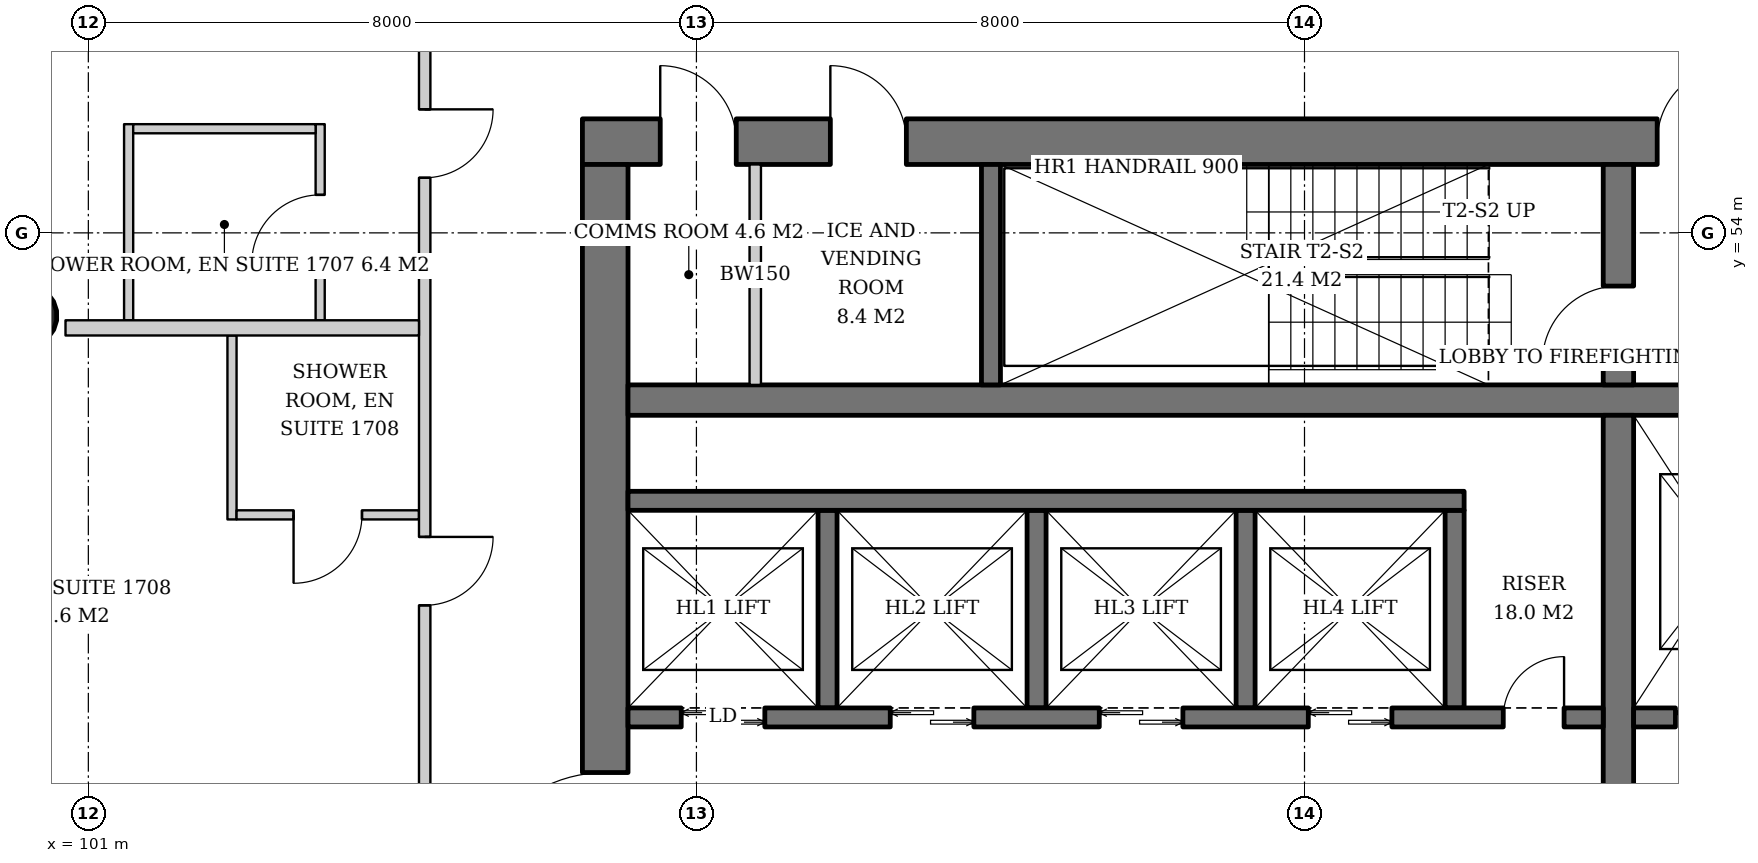
"""IFC4 building model, lengths in metres.
Left out: names, types, materials, properties, quantities, classifications, styles, units other than length and angle.
Written with IfcOpenShell. Run it as: python <this file> out.ifc"""

import sys

from ifc_helpers import new_model, si_unit, direction, frame, frame_2d, origin, origin_2d, place, context, subcontext, project, spatial, rectangle, hollow_circle, extrude, element, fill, save


model = new_model("IFC4")
c1 = context("Model", 3, precision=1e-05, world=origin(), true_north=direction((0.0, 1.0)))
c2 = subcontext(c1, "Body", "Model", "MODEL_VIEW")
j1 = project(units=[si_unit("LENGTHUNIT", "METRE"), si_unit("PLANEANGLEUNIT", "RADIAN")], contexts=[c1])
p1 = place(None, origin())
s1 = spatial("IfcSite", under=j1, at=p1, CompositionType="ELEMENT")
p2 = place(p1, origin())
s2 = spatial("IfcBuilding", under=s1, at=p2, CompositionType="ELEMENT")
p3 = place(p2, frame((0.0, 0.0, 70.4)))
s3 = spatial("IfcBuildingStorey", under=s2, at=p3, CompositionType="ELEMENT", Elevation=70.4)
p4 = place(p3, frame((100.129, 52.935, 0.0), z_axis=(0.043059584825, -0.021497706284, 0.998841188968), x_axis=(0.446680166538, 0.894693706707, 0.0)))
e1 = element("IfcColumn", 1, at=p4, inside=s3, PredefinedType="COLUMN", context=c2, shape_type="SweptSolid", body=[
    extrude(hollow_circle(Radius=0.406, WallThickness=0.03, at=origin_2d()), origin(), (0.0, 0.0, 1.0), 3.804),
])
p5 = place(p3, frame((107.5, 55.2, 0.0), z_axis=(0.0, 0.0, 1.0), x_axis=(1.0, 0.0, 0.0)))
e2 = element("IfcWall", 2, at=p5, inside=s3, PredefinedType="SHEAR", context=c2, shape_type="SweptSolid", body=[
    extrude(rectangle(XDim=19.0, YDim=0.6, at=frame_2d((9.5, 0.0))), origin(), (0.0, 0.0, 1.0), 3.8),
])
p6 = place(p5, frame((14.14, 0.0, 0.0)))
e3 = element("IfcOpeningElement", 3, at=p6, cuts=e2, PredefinedType="OPENING", context=c2, shape_type="SweptSolid", body=[
    extrude(rectangle(XDim=1.0, YDim=2.1, at=frame_2d((0.5, 1.05))), frame((0.0, 0.31, 0.0), z_axis=(0.0, -1.0, 0.0), x_axis=(1.0, 0.0, 0.0)), (0.0, 0.0, 1.0), 0.62),
])
p7 = place(p5, frame((1.024, 0.0, 0.0)))
e4 = element("IfcOpeningElement", 4, at=p7, cuts=e2, PredefinedType="OPENING", context=c2, shape_type="SweptSolid", body=[
    extrude(rectangle(XDim=1.0, YDim=2.1, at=frame_2d((0.5, 1.05))), frame((0.0, 0.31, 0.0), z_axis=(0.0, -1.0, 0.0), x_axis=(1.0, 0.0, 0.0)), (0.0, 0.0, 1.0), 0.62),
])
p8 = place(p5, frame((3.262, 0.0, 0.0)))
e5 = element("IfcOpeningElement", 5, at=p8, cuts=e2, PredefinedType="OPENING", context=c2, shape_type="SweptSolid", body=[
    extrude(rectangle(XDim=1.0, YDim=2.1, at=frame_2d((0.5, 1.05))), frame((0.0, 0.31, 0.0), z_axis=(0.0, -1.0, 0.0), x_axis=(1.0, 0.0, 0.0)), (0.0, 0.0, 1.0), 0.62),
])
p9 = place(p3, frame((107.8, 37.1, 0.0), z_axis=(0.0, 0.0, 1.0), x_axis=(0.0, 1.0, 0.0)))
e6 = element("IfcWall", 6, at=p9, inside=s3, PredefinedType="SHEAR", context=c2, shape_type="SweptSolid", body=[
    extrude(rectangle(XDim=17.8, YDim=0.6, at=frame_2d((8.9, 0.0))), origin(), (0.0, 0.0, 1.0), 3.8),
])
p10 = place(p9, frame((8.0, 0.0, 0.0)))
e7 = element("IfcOpeningElement", 7, at=p10, cuts=e6, PredefinedType="OPENING", context=c2, shape_type="SweptSolid", body=[
    extrude(rectangle(XDim=1.8, YDim=2.4, at=frame_2d((0.9, 1.2))), frame((0.0, 0.31, 0.0), z_axis=(0.0, -1.0, 0.0), x_axis=(1.0, 0.0, 0.0)), (0.0, 0.0, 1.0), 0.62),
])
p11 = place(p3, frame((108.1, 51.8, 0.0), z_axis=(0.0, 0.0, 1.0), x_axis=(1.0, 0.0, 0.0)))
e8 = element("IfcWall", 8, at=p11, inside=s3, PredefinedType="SHEAR", context=c2, shape_type="SweptSolid", body=[
    extrude(rectangle(XDim=17.8, YDim=0.4, at=frame_2d((8.9, 0.0))), origin(), (0.0, 0.0, 1.0), 3.8),
])
p12 = place(p3, frame((121.13, 40.4, 0.0), z_axis=(0.0, 0.0, 1.0), x_axis=(0.0, 1.0, 0.0)))
e9 = element("IfcWall", 9, at=p12, inside=s3, PredefinedType="SHEAR", context=c2, shape_type="SweptSolid", body=[
    extrude(rectangle(XDim=11.2, YDim=0.4, at=frame_2d((5.6, 0.0))), origin(), (0.0, 0.0, 1.0), 3.8),
])
p13 = place(p3, frame((121.13, 52.0, 0.0), z_axis=(0.0, 0.0, 1.0), x_axis=(0.0, 1.0, 0.0)))
e10 = element("IfcWall", 10, at=p13, inside=s3, PredefinedType="SHEAR", context=c2, shape_type="SweptSolid", body=[
    extrude(rectangle(XDim=2.9, YDim=0.4, at=frame_2d((1.45, 0.0))), origin(), (0.0, 0.0, 1.0), 3.8),
])
p14 = place(p13, frame((0.3, 0.0, 0.0)))
e11 = element("IfcOpeningElement", 11, at=p14, cuts=e10, PredefinedType="OPENING", context=c2, shape_type="SweptSolid", body=[
    extrude(rectangle(XDim=1.0, YDim=2.1, at=frame_2d((0.5, 1.05))), frame((0.0, 0.21, 0.0), z_axis=(0.0, -1.0, 0.0), x_axis=(1.0, 0.0, 0.0)), (0.0, 0.0, 1.0), 0.42),
])
p15 = place(p3, frame((112.875, 52.0, 0.0), z_axis=(0.0, 0.0, 1.0), x_axis=(0.0, 1.0, 0.0)))
e12 = element("IfcWall", 12, at=p15, inside=s3, PredefinedType="SHEAR", context=c2, shape_type="SweptSolid", body=[
    extrude(rectangle(XDim=2.9, YDim=0.25, at=frame_2d((1.45, 0.0))), origin(), (0.0, 0.0, 1.0), 3.8),
])
for number, where, z_axis, x_axis in (
    (13, (110.725, 47.75, 0.0), (0.0, 0.0, 1.0), (0.0, 1.0, 0.0)),
    (14, (113.475, 47.75, 0.0), (0.0, 0.0, 1.0), (0.0, 1.0, 0.0)),
    (15, (116.225, 47.75, 0.0), (0.0, 0.0, 1.0), (0.0, 1.0, 0.0)),
    (16, (118.975, 47.75, 0.0), (0.0, 0.0, 1.0), (0.0, 1.0, 0.0)),
):
    element("IfcWall", number, at=place(p3, frame(where, z_axis=z_axis, x_axis=x_axis)), inside=s3, PredefinedType="SHEAR", context=c2, shape_type="SweptSolid", body=[
        extrude(rectangle(XDim=2.6, YDim=0.25, at=frame_2d((1.3, 0.0))), origin(), (0.0, 0.0, 1.0), 3.8),
    ])
p16 = place(p3, frame((108.1, 50.475, 0.0), z_axis=(0.0, 0.0, 1.0), x_axis=(1.0, 0.0, 0.0)))
e17 = element("IfcWall", 17, at=p16, inside=s3, PredefinedType="SHEAR", context=c2, shape_type="SweptSolid", body=[
    extrude(rectangle(XDim=11.0, YDim=0.25, at=frame_2d((5.5, 0.0))), origin(), (0.0, 0.0, 1.0), 3.8),
])
p17 = place(p3, frame((108.1, 47.625, 0.0), z_axis=(0.0, 0.0, 1.0), x_axis=(1.0, 0.0, 0.0)))
e18 = element("IfcWall", 18, at=p17, inside=s3, PredefinedType="SHEAR", context=c2, shape_type="SweptSolid", body=[
    extrude(rectangle(XDim=12.83, YDim=0.25, at=frame_2d((6.415, 0.0))), origin(), (0.0, 0.0, 1.0), 3.8),
])
p18 = place(p17, frame((0.7, 0.0, 0.0)))
e19 = element("IfcOpeningElement", 19, at=p18, cuts=e18, PredefinedType="OPENING", context=c2, shape_type="SweptSolid", body=[
    extrude(rectangle(XDim=1.1, YDim=2.2, at=frame_2d((0.55, 1.1))), frame((0.0, 0.135, 0.0), z_axis=(0.0, -1.0, 0.0), x_axis=(1.0, 0.0, 0.0)), (0.0, 0.0, 1.0), 0.27),
])
p19 = place(p17, frame((3.45, 0.0, 0.0)))
e20 = element("IfcOpeningElement", 20, at=p19, cuts=e18, PredefinedType="OPENING", context=c2, shape_type="SweptSolid", body=[
    extrude(rectangle(XDim=1.1, YDim=2.2, at=frame_2d((0.55, 1.1))), frame((0.0, 0.135, 0.0), z_axis=(0.0, -1.0, 0.0), x_axis=(1.0, 0.0, 0.0)), (0.0, 0.0, 1.0), 0.27),
])
p20 = place(p17, frame((6.2, 0.0, 0.0)))
e21 = element("IfcOpeningElement", 21, at=p20, cuts=e18, PredefinedType="OPENING", context=c2, shape_type="SweptSolid", body=[
    extrude(rectangle(XDim=1.1, YDim=2.2, at=frame_2d((0.55, 1.1))), frame((0.0, 0.135, 0.0), z_axis=(0.0, -1.0, 0.0), x_axis=(1.0, 0.0, 0.0)), (0.0, 0.0, 1.0), 0.27),
])
p21 = place(p17, frame((8.95, 0.0, 0.0)))
e22 = element("IfcOpeningElement", 22, at=p21, cuts=e18, PredefinedType="OPENING", context=c2, shape_type="SweptSolid", body=[
    extrude(rectangle(XDim=1.1, YDim=2.2, at=frame_2d((0.55, 1.1))), frame((0.0, 0.135, 0.0), z_axis=(0.0, -1.0, 0.0), x_axis=(1.0, 0.0, 0.0)), (0.0, 0.0, 1.0), 0.27),
])
p22 = place(p17, frame((11.515, 0.0, 0.0)))
e23 = element("IfcOpeningElement", 23, at=p22, cuts=e18, PredefinedType="OPENING", context=c2, shape_type="SweptSolid", body=[
    extrude(rectangle(XDim=0.8, YDim=2.0, at=frame_2d((0.4, 1.0))), frame((0.0, 0.135, 0.0), z_axis=(0.0, -1.0, 0.0), x_axis=(1.0, 0.0, 0.0)), (0.0, 0.0, 1.0), 0.27),
])
p23 = place(p3, frame((121.33, 47.625, 0.0), z_axis=(0.0, 0.0, 1.0), x_axis=(1.0, 0.0, 0.0)))
e24 = element("IfcWall", 24, at=p23, inside=s3, PredefinedType="SHEAR", context=c2, shape_type="SweptSolid", body=[
    extrude(rectangle(XDim=4.57, YDim=0.25, at=frame_2d((2.285, 0.0))), origin(), (0.0, 0.0, 1.0), 3.8),
])
p24 = place(p23, frame((0.55, 0.0, 0.0)))
e25 = element("IfcOpeningElement", 25, at=p24, cuts=e24, PredefinedType="OPENING", context=c2, shape_type="SweptSolid", body=[
    extrude(rectangle(XDim=1.4, YDim=2.4, at=frame_2d((0.7, 1.2))), frame((0.0, 0.135, 0.0), z_axis=(0.0, -1.0, 0.0), x_axis=(1.0, 0.0, 0.0)), (0.0, 0.0, 1.0), 0.27),
])
p25 = place(p23, frame((3.26, 0.0, 0.0)))
e26 = element("IfcOpeningElement", 26, at=p25, cuts=e24, PredefinedType="OPENING", context=c2, shape_type="SweptSolid", body=[
    extrude(rectangle(XDim=0.8, YDim=2.0, at=frame_2d((0.4, 1.0))), frame((0.0, 0.135, 0.0), z_axis=(0.0, -1.0, 0.0), x_axis=(1.0, 0.0, 0.0)), (0.0, 0.0, 1.0), 0.27),
])
p26 = place(p3, frame((109.774, 52.0, 0.0), z_axis=(0.0, 0.0, 1.0), x_axis=(0.0, 1.0, 0.0)))
e27 = element("IfcWall", 27, at=p26, inside=s3, PredefinedType="SOLIDWALL", context=c2, shape_type="SweptSolid", body=[
    extrude(rectangle(XDim=2.9, YDim=0.15, at=frame_2d((1.45, 0.0))), origin(), (0.0, 0.0, 1.0), 3.6),
])
p27 = place(p3, frame((104.05, 52.85, 0.0), z_axis=(0.0, 0.0, 1.0), x_axis=(0.0, 1.0, 0.0)))
e28 = element("IfcWall", 28, at=p27, inside=s3, PredefinedType="PARTITIONING", context=c2, shape_type="SweptSolid", body=[
    extrude(rectangle(XDim=2.58, YDim=0.12, at=frame_2d((1.29, 0.0))), origin(), (0.0, 0.0, 1.0), 2.8),
])
p28 = place(p27, frame((0.75, 0.0, 0.0)))
e29 = element("IfcOpeningElement", 29, at=p28, cuts=e28, PredefinedType="OPENING", context=c2, shape_type="SweptSolid", body=[
    extrude(rectangle(XDim=0.9, YDim=2.1, at=frame_2d((0.45, 1.05))), frame((0.0, 0.07, 0.0), z_axis=(0.0, -1.0, 0.0), x_axis=(1.0, 0.0, 0.0)), (0.0, 0.0, 1.0), 0.14),
])
p29 = place(p3, frame((101.53, 52.85, 0.0), z_axis=(0.0, 0.0, 1.0), x_axis=(0.0, 1.0, 0.0)))
e30 = element("IfcWall", 30, at=p29, inside=s3, PredefinedType="PARTITIONING", context=c2, shape_type="SweptSolid", body=[
    extrude(rectangle(XDim=2.58, YDim=0.12, at=frame_2d((1.29, 0.0))), origin(), (0.0, 0.0, 1.0), 2.8),
])
p30 = place(p3, frame((103.99, 55.37, 0.0), z_axis=(0.0, 0.0, 1.0), x_axis=(-1.0, 0.0, 0.0)))
e31 = element("IfcWall", 31, at=p30, inside=s3, PredefinedType="PARTITIONING", context=c2, shape_type="SweptSolid", body=[
    extrude(rectangle(XDim=2.4, YDim=0.12, at=frame_2d((1.2, 0.0))), origin(), (0.0, 0.0, 1.0), 2.8),
])
p31 = place(p3, frame((102.89, 52.65, 0.0), z_axis=(0.0, 0.0, 1.0), x_axis=(0.0, -1.0, 0.0)))
e32 = element("IfcWall", 32, at=p31, inside=s3, PredefinedType="PARTITIONING", context=c2, shape_type="SweptSolid", body=[
    extrude(rectangle(XDim=2.42, YDim=0.12, at=frame_2d((1.21, 0.0))), origin(), (0.0, 0.0, 1.0), 2.847),
])
p32 = place(p3, frame((105.35, 50.29, 0.0), z_axis=(0.0, 0.0, 1.0), x_axis=(-1.0, 0.0, 0.0)))
e33 = element("IfcWall", 33, at=p32, inside=s3, PredefinedType="PARTITIONING", context=c2, shape_type="SweptSolid", body=[
    extrude(rectangle(XDim=2.4, YDim=0.12, at=frame_2d((1.2, 0.0))), origin(), (0.0, 0.0, 1.0), 3.6),
])
p33 = place(p32, frame((0.75, 0.0, 0.0)))
e34 = element("IfcOpeningElement", 34, at=p33, cuts=e33, PredefinedType="OPENING", context=c2, shape_type="SweptSolid", body=[
    extrude(rectangle(XDim=0.9, YDim=2.1, at=frame_2d((0.45, 1.05))), frame((0.0, 0.07, 0.0), z_axis=(0.0, -1.0, 0.0), x_axis=(1.0, 0.0, 0.0)), (0.0, 0.0, 1.0), 0.14),
])
p34 = place(p3, frame((105.425, 57.65, 0.0), z_axis=(0.0, 0.0, 1.0), x_axis=(0.0, -1.0, 0.0)))
e35 = element("IfcWall", 35, at=p34, inside=s3, PredefinedType="PARTITIONING", context=c2, shape_type="SweptSolid", body=[
    extrude(rectangle(XDim=23.15, YDim=0.15, at=frame_2d((11.575, 0.0))), origin(), (0.0, 0.0, 1.0), 2.8),
])
p35 = place(p34, frame((2.025, 0.0, 0.0)))
e36 = element("IfcOpeningElement", 36, at=p35, cuts=e35, PredefinedType="OPENING", context=c2, shape_type="SweptSolid", body=[
    extrude(rectangle(XDim=0.9, YDim=2.1, at=frame_2d((0.45, 1.05))), frame((0.0, 0.085, 0.0), z_axis=(0.0, -1.0, 0.0), x_axis=(1.0, 0.0, 0.0)), (0.0, 0.0, 1.0), 0.17),
])
p36 = place(p34, frame((7.65, 0.0, 0.0)))
e37 = element("IfcOpeningElement", 37, at=p36, cuts=e35, PredefinedType="OPENING", context=c2, shape_type="SweptSolid", body=[
    extrude(rectangle(XDim=0.9, YDim=2.1, at=frame_2d((0.45, 1.05))), frame((0.0, 0.085, 0.0), z_axis=(0.0, -1.0, 0.0), x_axis=(1.0, 0.0, 0.0)), (0.0, 0.0, 1.0), 0.17),
])
p37 = place(p34, frame((16.6, 0.0, 0.0)))
e38 = element("IfcOpeningElement", 38, at=p37, cuts=e35, PredefinedType="OPENING", context=c2, shape_type="SweptSolid", body=[
    extrude(rectangle(XDim=1.0, YDim=2.1, at=frame_2d((0.5, 1.05))), frame((0.0, 0.085, 0.0), z_axis=(0.0, -1.0, 0.0), x_axis=(1.0, 0.0, 0.0)), (0.0, 0.0, 1.0), 0.17),
])
p38 = place(p3, frame((105.35, 52.75, 0.0), z_axis=(0.0, 0.0, 1.0), x_axis=(-1.0, 0.0, 0.0)))
e39 = element("IfcWall", 39, at=p38, inside=s3, PredefinedType="PARTITIONING", context=c2, shape_type="SweptSolid", body=[
    extrude(rectangle(XDim=4.65, YDim=0.2, at=frame_2d((2.325, 0.0))), origin(), (0.0, 0.0, 1.0), 3.6),
])
p39 = place(p18, origin())
e40 = element("IfcDoor", 40, at=p39, inside=s3, OperationType="DOUBLE_DOOR_SLIDING", PredefinedType="DOOR", context=c2, shape_type="SweptSolid", body=[
    extrude(rectangle(XDim=1.1, YDim=2.2, at=frame_2d((0.55, 1.1))), frame((0.0, 0.025, 0.0), z_axis=(0.0, -1.0, 0.0), x_axis=(1.0, 0.0, 0.0)), (0.0, 0.0, 1.0), 0.05),
])
fill(e19, e40)
p40 = place(p19, origin())
e41 = element("IfcDoor", 41, at=p40, inside=s3, OperationType="DOUBLE_DOOR_SLIDING", PredefinedType="DOOR", context=c2, shape_type="SweptSolid", body=[
    extrude(rectangle(XDim=1.1, YDim=2.2, at=frame_2d((0.55, 1.1))), frame((0.0, 0.025, 0.0), z_axis=(0.0, -1.0, 0.0), x_axis=(1.0, 0.0, 0.0)), (0.0, 0.0, 1.0), 0.05),
])
fill(e20, e41)
p41 = place(p20, origin())
e42 = element("IfcDoor", 42, at=p41, inside=s3, OperationType="DOUBLE_DOOR_SLIDING", PredefinedType="DOOR", context=c2, shape_type="SweptSolid", body=[
    extrude(rectangle(XDim=1.1, YDim=2.2, at=frame_2d((0.55, 1.1))), frame((0.0, 0.025, 0.0), z_axis=(0.0, -1.0, 0.0), x_axis=(1.0, 0.0, 0.0)), (0.0, 0.0, 1.0), 0.05),
])
fill(e21, e42)
p42 = place(p21, origin())
e43 = element("IfcDoor", 43, at=p42, inside=s3, OperationType="DOUBLE_DOOR_SLIDING", PredefinedType="DOOR", context=c2, shape_type="SweptSolid", body=[
    extrude(rectangle(XDim=1.1, YDim=2.2, at=frame_2d((0.55, 1.1))), frame((0.0, 0.025, 0.0), z_axis=(0.0, -1.0, 0.0), x_axis=(1.0, 0.0, 0.0)), (0.0, 0.0, 1.0), 0.05),
])
fill(e22, e43)
p43 = place(p22, origin())
e44 = element("IfcDoor", 44, at=p43, inside=s3, OperationType="SINGLE_SWING_RIGHT", PredefinedType="DOOR", context=c2, shape_type="SweptSolid", body=[
    extrude(rectangle(XDim=0.8, YDim=2.0, at=frame_2d((0.4, 1.0))), frame((0.0, 0.025, 0.0), z_axis=(0.0, -1.0, 0.0), x_axis=(1.0, 0.0, 0.0)), (0.0, 0.0, 1.0), 0.05),
])
fill(e23, e44)
p44 = place(p24, origin())
e45 = element("IfcDoor", 45, at=p44, inside=s3, OperationType="DOUBLE_DOOR_SLIDING", PredefinedType="DOOR", context=c2, shape_type="SweptSolid", body=[
    extrude(rectangle(XDim=1.4, YDim=2.4, at=frame_2d((0.7, 1.2))), frame((0.0, 0.025, 0.0), z_axis=(0.0, -1.0, 0.0), x_axis=(1.0, 0.0, 0.0)), (0.0, 0.0, 1.0), 0.05),
])
fill(e25, e45)
p45 = place(p14, origin())
e46 = element("IfcDoor", 46, at=p45, inside=s3, OperationType="SINGLE_SWING_LEFT", PredefinedType="DOOR", context=c2, shape_type="SweptSolid", body=[
    extrude(rectangle(XDim=1.0, YDim=2.1, at=frame_2d((0.5, 1.05))), frame((0.0, 0.025, 0.0), z_axis=(0.0, -1.0, 0.0), x_axis=(1.0, 0.0, 0.0)), (0.0, 0.0, 1.0), 0.05),
])
fill(e11, e46)
p46 = place(p6, origin())
e47 = element("IfcDoor", 47, at=p46, inside=s3, OperationType="SINGLE_SWING_RIGHT", PredefinedType="DOOR", context=c2, shape_type="SweptSolid", body=[
    extrude(rectangle(XDim=1.0, YDim=2.1, at=frame_2d((0.5, 1.05))), frame((0.0, 0.025, 0.0), z_axis=(0.0, -1.0, 0.0), x_axis=(1.0, 0.0, 0.0)), (0.0, 0.0, 1.0), 0.05),
])
fill(e3, e47)
p47 = place(p10, origin())
e48 = element("IfcDoor", 48, at=p47, inside=s3, OperationType="DOUBLE_DOOR_SINGLE_SWING", PredefinedType="DOOR", context=c2, shape_type="SweptSolid", body=[
    extrude(rectangle(XDim=1.8, YDim=2.4, at=frame_2d((0.9, 1.2))), frame((0.0, 0.025, 0.0), z_axis=(0.0, -1.0, 0.0), x_axis=(1.0, 0.0, 0.0)), (0.0, 0.0, 1.0), 0.05),
])
fill(e7, e48)
p48 = place(p7, origin())
e49 = element("IfcDoor", 49, at=p48, inside=s3, OperationType="SINGLE_SWING_LEFT", PredefinedType="DOOR", context=c2, shape_type="SweptSolid", body=[
    extrude(rectangle(XDim=1.0, YDim=2.1, at=frame_2d((0.5, 1.05))), frame((0.0, -0.24, 0.0), z_axis=(0.0, -1.0, 0.0), x_axis=(1.0, 0.0, 0.0)), (0.0, 0.0, 1.0), 0.05),
])
fill(e4, e49)
p49 = place(p8, origin())
e50 = element("IfcDoor", 50, at=p49, inside=s3, OperationType="SINGLE_SWING_LEFT", PredefinedType="DOOR", context=c2, shape_type="SweptSolid", body=[
    extrude(rectangle(XDim=1.0, YDim=2.1, at=frame_2d((0.5, 1.05))), frame((0.0, -0.24, 0.0), z_axis=(0.0, -1.0, 0.0), x_axis=(1.0, 0.0, 0.0)), (0.0, 0.0, 1.0), 0.05),
])
fill(e5, e50)
p50 = place(p28, origin())
e51 = element("IfcDoor", 51, at=p50, inside=s3, OperationType="SINGLE_SWING_LEFT", PredefinedType="DOOR", context=c2, shape_type="SweptSolid", body=[
    extrude(rectangle(XDim=0.9, YDim=2.1, at=frame_2d((0.45, 1.05))), frame((0.0, 0.025, 0.0), z_axis=(0.0, -1.0, 0.0), x_axis=(1.0, 0.0, 0.0)), (0.0, 0.0, 1.0), 0.05),
])
fill(e29, e51)
p51 = place(p33, origin())
e52 = element("IfcDoor", 52, at=p51, inside=s3, OperationType="SINGLE_SWING_RIGHT", PredefinedType="DOOR", context=c2, shape_type="SweptSolid", body=[
    extrude(rectangle(XDim=0.9, YDim=2.1, at=frame_2d((0.45, 1.05))), frame((0.0, 0.025, 0.0), z_axis=(0.0, -1.0, 0.0), x_axis=(1.0, 0.0, 0.0)), (0.0, 0.0, 1.0), 0.05),
])
fill(e34, e52)
p52 = place(p35, origin())
e53 = element("IfcDoor", 53, at=p52, inside=s3, OperationType="SINGLE_SWING_LEFT", PredefinedType="DOOR", context=c2, shape_type="SweptSolid", body=[
    extrude(rectangle(XDim=0.9, YDim=2.1, at=frame_2d((0.45, 1.05))), frame((0.0, 0.025, 0.0), z_axis=(0.0, -1.0, 0.0), x_axis=(1.0, 0.0, 0.0)), (0.0, 0.0, 1.0), 0.05),
])
fill(e36, e53)
p53 = place(p36, origin())
e54 = element("IfcDoor", 54, at=p53, inside=s3, OperationType="SINGLE_SWING_LEFT", PredefinedType="DOOR", context=c2, shape_type="SweptSolid", body=[
    extrude(rectangle(XDim=0.9, YDim=2.1, at=frame_2d((0.45, 1.05))), frame((0.0, 0.025, 0.0), z_axis=(0.0, -1.0, 0.0), x_axis=(1.0, 0.0, 0.0)), (0.0, 0.0, 1.0), 0.05),
])
fill(e37, e54)
save(model, sys.argv[1])
